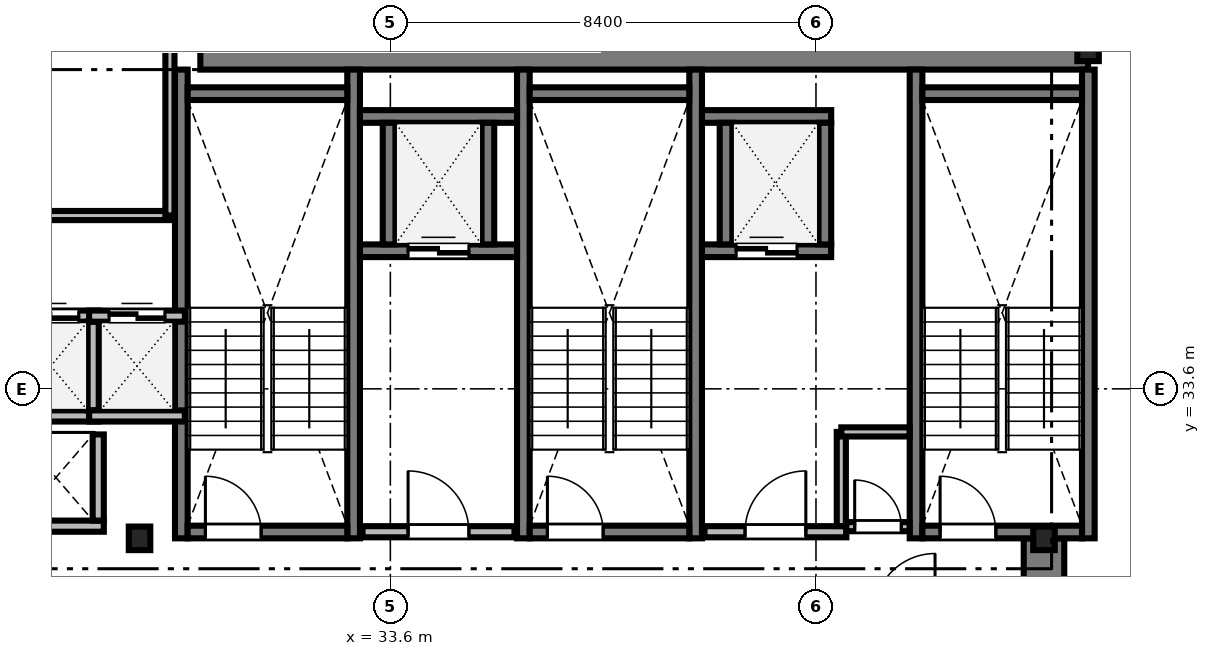
"""IFC4 building model, lengths in metres.
Left out: names, types, materials, properties, quantities, classifications, styles, units other than length and angle.
Written with IfcOpenShell. Run it as: python <this file> out.ifc"""

import sys

from ifc_helpers import new_model, si_unit, direction, frame, frame_2d, origin, origin_2d, place, context, subcontext, project, spatial, rectangle, i_section, extrude, source, transform, mapped, element, fill, save


model = new_model("IFC4")
c1 = context("Model", 3, precision=1e-05, world=origin(), true_north=direction((0.0, 1.0)))
c2 = subcontext(c1, "Body", "Model", "MODEL_VIEW")
j1 = project(units=[si_unit("LENGTHUNIT", "METRE"), si_unit("PLANEANGLEUNIT", "RADIAN")], contexts=[c1])
p1 = place(None, origin())
s1 = spatial("IfcSite", under=j1, at=p1, CompositionType="ELEMENT")
p2 = place(p1, origin())
s2 = spatial("IfcBuilding", under=s1, at=p2, CompositionType="ELEMENT")
p3 = place(p2, frame((0.0, 0.0, 148.3)))
s3 = spatial("IfcBuildingStorey", under=s2, at=p3, CompositionType="ELEMENT", Elevation=148.3)
m1 = source(origin(), c2, "Body", "SweptSolid", [
    extrude(rectangle(XDim=17.52, YDim=0.8, at=frame_2d((8.76, 0.0))), origin(), (0.0, 0.0, 1.0), 3.46),
])
p4 = place(p3, frame((29.85, 40.3, 0.0), z_axis=(0.0, 0.0, 1.0), x_axis=(1.0, 0.0, 0.0)))
e1 = element("IfcWall", 1, at=p4, inside=s3, PredefinedType="SHEAR", context=c2, shape_type="MappedRepresentation", body=[
    mapped(m1, transform((0.0, 0.0, 0.0), scale=1.0)),
])
m2 = source(origin(), c2, "Body", "SweptSolid", [
    extrude(rectangle(XDim=13.15, YDim=0.8, at=frame_2d((6.575, 0.0))), origin(), (0.0, 0.0, 1.0), 3.46),
])
p5 = place(p3, frame((46.5, 17.5, 0.0), z_axis=(0.0, 0.0, 1.0), x_axis=(0.0, 1.0, 0.0)))
e2 = element("IfcWall", 2, at=p5, inside=s3, PredefinedType="SHEAR", context=c2, shape_type="MappedRepresentation", body=[
    mapped(m2, transform((0.0, 0.0, 0.0), scale=1.0)),
])
m3 = source(origin(), c2, "Body", "SweptSolid", [
    extrude(i_section(OverallWidth=0.424, OverallDepth=0.465, WebThickness=0.035, FlangeThickness=0.056, FilletRadius=0.015, at=origin_2d()), origin(), (0.0, 0.0, 1.0), 3.46),
])
for number, where, z_axis, x_axis in (
    (3, (28.65, 30.65, 0.0), (0.0, 0.0, 1.0), (1.0, 0.0, 0.0)),
    (4, (46.5, 30.65, 0.0), (0.0, 0.0, 1.0), (1.0, 0.0, 0.0)),
    (5, (47.37, 40.3, 0.0), (0.0, 0.0, 1.0), (1.0, 0.0, 0.0)),
):
    element("IfcColumn", number, at=place(p3, frame(where, z_axis=z_axis, x_axis=x_axis)), inside=s3, PredefinedType="COLUMN", context=c2, shape_type="MappedRepresentation", body=[
        mapped(m3, transform((0.0, 0.0, 0.0), scale=1.0)),
    ])
m4 = source(origin(), c2, "Body", "SweptSolid", [
    extrude(rectangle(XDim=9.25, YDim=0.25, at=frame_2d((4.625, 0.0))), origin(), (0.0, 0.0, 1.0), 3.5),
])
for number, where, z_axis, x_axis in (
    (6, (29.475, 30.65, 0.0), (0.0, 0.0, 1.0), (0.0, 1.0, 0.0)),
    (7, (32.875, 30.65, 0.0), (0.0, 0.0, 1.0), (0.0, 1.0, 0.0)),
):
    element("IfcWall", number, at=place(p3, frame(where, z_axis=z_axis, x_axis=x_axis)), inside=s3, PredefinedType="SOLIDWALL", context=c2, shape_type="MappedRepresentation", body=[
        mapped(m4, transform((0.0, 0.0, 0.0), scale=1.0)),
    ])
m5 = source(origin(), c2, "Body", "SweptSolid", [
    extrude(rectangle(XDim=3.15, YDim=0.25, at=frame_2d((1.575, 0.0))), origin(), (0.0, 0.0, 1.0), 3.5),
])
p6 = place(p3, frame((29.6, 39.425, 0.0), z_axis=(0.0, 0.0, 1.0), x_axis=(1.0, 0.0, 0.0)))
e8 = element("IfcWall", 8, at=p6, inside=s3, PredefinedType="SOLIDWALL", context=c2, shape_type="MappedRepresentation", body=[
    mapped(m5, transform((0.0, 0.0, 0.0), scale=1.0)),
])
p7 = place(p3, frame((29.6, 30.775, 0.0), z_axis=(0.0, 0.0, 1.0), x_axis=(1.0, 0.0, 0.0)))
e9 = element("IfcWall", 9, at=p7, inside=s3, PredefinedType="SOLIDWALL", context=c2, shape_type="MappedRepresentation", body=[
    mapped(m5, transform((0.0, 0.0, 0.0), scale=1.0)),
])
m6 = source(origin(), c2, "Body", "SweptSolid", [
    extrude(rectangle(XDim=1.1, YDim=2.2, at=frame_2d((0.55, 1.1))), frame((0.0, 0.135, 0.0), z_axis=(0.0, -1.0, 0.0), x_axis=(1.0, 0.0, 0.0)), (0.0, 0.0, 1.0), 0.27),
])
p8 = place(p7, frame((0.35, 0.0, 0.0)))
e10 = element("IfcOpeningElement", 10, at=p8, cuts=e9, PredefinedType="OPENING", context=c2, shape_type="MappedRepresentation", body=[
    mapped(m6, transform((0.0, 0.0, 0.0), scale=1.0)),
])
for number, where, z_axis, x_axis in (
    (11, (36.225, 30.65, 0.0), (0.0, 0.0, 1.0), (0.0, 1.0, 0.0)),
    (12, (39.625, 30.65, 0.0), (0.0, 0.0, 1.0), (0.0, 1.0, 0.0)),
):
    element("IfcWall", number, at=place(p3, frame(where, z_axis=z_axis, x_axis=x_axis)), inside=s3, PredefinedType="SOLIDWALL", context=c2, shape_type="MappedRepresentation", body=[
        mapped(m4, transform((0.0, 0.0, 0.0), scale=1.0)),
    ])
p9 = place(p3, frame((36.35, 39.425, 0.0), z_axis=(0.0, 0.0, 1.0), x_axis=(1.0, 0.0, 0.0)))
e13 = element("IfcWall", 13, at=p9, inside=s3, PredefinedType="SOLIDWALL", context=c2, shape_type="MappedRepresentation", body=[
    mapped(m5, transform((0.0, 0.0, 0.0), scale=1.0)),
])
p10 = place(p3, frame((36.35, 30.775, 0.0), z_axis=(0.0, 0.0, 1.0), x_axis=(1.0, 0.0, 0.0)))
e14 = element("IfcWall", 14, at=p10, inside=s3, PredefinedType="SOLIDWALL", context=c2, shape_type="MappedRepresentation", body=[
    mapped(m5, transform((0.0, 0.0, 0.0), scale=1.0)),
])
p11 = place(p10, frame((0.35, 0.0, 0.0)))
e15 = element("IfcOpeningElement", 15, at=p11, cuts=e14, PredefinedType="OPENING", context=c2, shape_type="MappedRepresentation", body=[
    mapped(m6, transform((0.0, 0.0, 0.0), scale=1.0)),
])
for number, where, z_axis, x_axis in (
    (16, (43.975, 30.65, 0.0), (0.0, 0.0, 1.0), (0.0, 1.0, 0.0)),
    (17, (47.375, 30.65, 0.0), (0.0, 0.0, 1.0), (0.0, 1.0, 0.0)),
):
    element("IfcWall", number, at=place(p3, frame(where, z_axis=z_axis, x_axis=x_axis)), inside=s3, PredefinedType="SOLIDWALL", context=c2, shape_type="MappedRepresentation", body=[
        mapped(m4, transform((0.0, 0.0, 0.0), scale=1.0)),
    ])
p12 = place(p3, frame((44.1, 39.425, 0.0), z_axis=(0.0, 0.0, 1.0), x_axis=(1.0, 0.0, 0.0)))
e18 = element("IfcWall", 18, at=p12, inside=s3, PredefinedType="SOLIDWALL", context=c2, shape_type="MappedRepresentation", body=[
    mapped(m5, transform((0.0, 0.0, 0.0), scale=1.0)),
])
p13 = place(p3, frame((44.1, 30.775, 0.0), z_axis=(0.0, 0.0, 1.0), x_axis=(1.0, 0.0, 0.0)))
e19 = element("IfcWall", 19, at=p13, inside=s3, PredefinedType="SOLIDWALL", context=c2, shape_type="MappedRepresentation", body=[
    mapped(m5, transform((0.0, 0.0, 0.0), scale=1.0)),
])
p14 = place(p13, frame((0.35, 0.0, 0.0)))
e20 = element("IfcOpeningElement", 20, at=p14, cuts=e19, PredefinedType="OPENING", context=c2, shape_type="MappedRepresentation", body=[
    mapped(m6, transform((0.0, 0.0, 0.0), scale=1.0)),
])
m7 = source(origin(), c2, "Body", "SweptSolid", [
    extrude(rectangle(XDim=3.0, YDim=0.22, at=frame_2d((1.5, 0.0))), origin(), (0.0, 0.0, 1.0), 3.46),
])
p15 = place(p3, frame((33.05, 30.78, 0.0), z_axis=(0.0, 0.0, 1.0), x_axis=(1.0, 0.0, 0.0)))
e21 = element("IfcWall", 21, at=p15, inside=s3, PredefinedType="SOLIDWALL", context=c2, shape_type="MappedRepresentation", body=[
    mapped(m7, transform((0.0, 0.0, 0.0), scale=1.0)),
])
m8 = source(origin(), c2, "Body", "SweptSolid", [
    extrude(rectangle(XDim=1.2, YDim=2.2, at=frame_2d((0.6, 1.1))), frame((0.0, 0.12, 0.0), z_axis=(0.0, -1.0, 0.0), x_axis=(1.0, 0.0, 0.0)), (0.0, 0.0, 1.0), 0.24),
])
p16 = place(p15, frame((0.9, 0.0, 0.0)))
e22 = element("IfcOpeningElement", 22, at=p16, cuts=e21, PredefinedType="OPENING", context=c2, shape_type="MappedRepresentation", body=[
    mapped(m8, transform((0.0, 0.0, 0.0), scale=1.0)),
])
m9 = source(origin(), c2, "Body", "SweptSolid", [
    extrude(rectangle(XDim=2.8, YDim=0.22, at=frame_2d((1.4, 0.0))), origin(), (0.0, 0.0, 1.0), 3.46),
])
p17 = place(p3, frame((39.8, 30.78, 0.0), z_axis=(0.0, 0.0, 1.0), x_axis=(1.0, 0.0, 0.0)))
e23 = element("IfcWall", 23, at=p17, inside=s3, PredefinedType="SOLIDWALL", context=c2, shape_type="MappedRepresentation", body=[
    mapped(m9, transform((0.0, 0.0, 0.0), scale=1.0)),
])
p18 = place(p17, frame((0.8, 0.0, 0.0)))
e24 = element("IfcOpeningElement", 24, at=p18, cuts=e23, PredefinedType="OPENING", context=c2, shape_type="MappedRepresentation", body=[
    mapped(m8, transform((0.0, 0.0, 0.0), scale=1.0)),
])
m10 = source(origin(), c2, "Body", "SweptSolid", [
    extrude(rectangle(XDim=1.89, YDim=0.22, at=frame_2d((0.945, 0.0))), origin(), (0.0, 0.0, 1.0), 3.46),
])
p19 = place(p3, frame((25.955, 33.065, 0.0), z_axis=(0.0, 0.0, 1.0), x_axis=(1.0, 0.0, 0.0)))
e25 = element("IfcWall", 25, at=p19, inside=s3, PredefinedType="SOLIDWALL", context=c2, shape_type="MappedRepresentation", body=[
    mapped(m10, transform((0.0, 0.0, 0.0), scale=1.0)),
])
p20 = place(p3, frame((25.955, 35.035, 0.0), z_axis=(0.0, 0.0, 1.0), x_axis=(1.0, 0.0, 0.0)))
e26 = element("IfcWall", 26, at=p20, inside=s3, PredefinedType="SOLIDWALL", context=c2, shape_type="MappedRepresentation", body=[
    mapped(m10, transform((0.0, 0.0, 0.0), scale=1.0)),
])
m11 = source(origin(), c2, "Body", "SweptSolid", [
    extrude(rectangle(XDim=1.1, YDim=2.2, at=frame_2d((0.55, 1.1))), frame((0.0, 0.12, 0.0), z_axis=(0.0, -1.0, 0.0), x_axis=(1.0, 0.0, 0.0)), (0.0, 0.0, 1.0), 0.24),
])
p21 = place(p20, frame((0.395, 0.0, 0.0)))
e27 = element("IfcOpeningElement", 27, at=p21, cuts=e26, PredefinedType="OPENING", context=c2, shape_type="MappedRepresentation", body=[
    mapped(m11, transform((0.0, 0.0, 0.0), scale=1.0)),
])
m12 = source(origin(), c2, "Body", "SweptSolid", [
    extrude(rectangle(XDim=1.75, YDim=0.22, at=frame_2d((0.875, 0.0))), origin(), (0.0, 0.0, 1.0), 3.46),
])
p22 = place(p3, frame((27.735, 33.175, 0.0), z_axis=(0.0, 0.0, 1.0), x_axis=(0.0, 1.0, 0.0)))
e28 = element("IfcWall", 28, at=p22, inside=s3, PredefinedType="SOLIDWALL", context=c2, shape_type="MappedRepresentation", body=[
    mapped(m12, transform((0.0, 0.0, 0.0), scale=1.0)),
])
p23 = place(p3, frame((27.655, 33.065, 0.0), z_axis=(0.0, 0.0, 1.0), x_axis=(1.0, 0.0, 0.0)))
e29 = element("IfcWall", 29, at=p23, inside=s3, PredefinedType="SOLIDWALL", context=c2, shape_type="MappedRepresentation", body=[
    mapped(m10, transform((0.0, 0.0, 0.0), scale=1.0)),
])
p24 = place(p3, frame((27.655, 35.035, 0.0), z_axis=(0.0, 0.0, 1.0), x_axis=(1.0, 0.0, 0.0)))
e30 = element("IfcWall", 30, at=p24, inside=s3, PredefinedType="SOLIDWALL", context=c2, shape_type="MappedRepresentation", body=[
    mapped(m10, transform((0.0, 0.0, 0.0), scale=1.0)),
])
p25 = place(p24, frame((0.395, 0.0, 0.0)))
e31 = element("IfcOpeningElement", 31, at=p25, cuts=e30, PredefinedType="OPENING", context=c2, shape_type="MappedRepresentation", body=[
    mapped(m11, transform((0.0, 0.0, 0.0), scale=1.0)),
])
m13 = source(origin(), c2, "Body", "SweptSolid", [
    extrude(rectangle(XDim=3.1, YDim=0.25, at=frame_2d((1.55, 0.0))), origin(), (0.0, 0.0, 1.0), 3.46),
])
p26 = place(p3, frame((33.0, 36.325, 0.0), z_axis=(0.0, 0.0, 1.0), x_axis=(1.0, 0.0, 0.0)))
e32 = element("IfcWall", 32, at=p26, inside=s3, PredefinedType="SOLIDWALL", context=c2, shape_type="MappedRepresentation", body=[
    mapped(m13, transform((0.0, 0.0, 0.0), scale=1.0)),
])
m14 = source(origin(), c2, "Body", "SweptSolid", [
    extrude(rectangle(XDim=1.2, YDim=2.25, at=frame_2d((0.6, 1.125))), frame((0.0, 0.135, 0.0), z_axis=(0.0, -1.0, 0.0), x_axis=(1.0, 0.0, 0.0)), (0.0, 0.0, 1.0), 0.27),
])
p27 = place(p26, frame((0.95, 0.0, 0.0)))
e33 = element("IfcOpeningElement", 33, at=p27, cuts=e32, PredefinedType="OPENING", context=c2, shape_type="MappedRepresentation", body=[
    mapped(m14, transform((0.0, 0.0, 0.0), scale=1.0)),
])
p28 = place(p3, frame((33.0, 38.975, 0.0), z_axis=(0.0, 0.0, 1.0), x_axis=(1.0, 0.0, 0.0)))
e34 = element("IfcWall", 34, at=p28, inside=s3, PredefinedType="SOLIDWALL", context=c2, shape_type="MappedRepresentation", body=[
    mapped(m13, transform((0.0, 0.0, 0.0), scale=1.0)),
])
m15 = source(origin(), c2, "Body", "SweptSolid", [
    extrude(rectangle(XDim=2.4, YDim=0.25, at=frame_2d((1.2, 0.0))), origin(), (0.0, 0.0, 1.0), 3.46),
])
for number, where, z_axis, x_axis in (
    (35, (33.575, 36.45, 0.0), (0.0, 0.0, 1.0), (0.0, 1.0, 0.0)),
    (36, (35.525, 36.45, 0.0), (0.0, 0.0, 1.0), (0.0, 1.0, 0.0)),
):
    element("IfcWall", number, at=place(p3, frame(where, z_axis=z_axis, x_axis=x_axis)), inside=s3, PredefinedType="SOLIDWALL", context=c2, shape_type="MappedRepresentation", body=[
        mapped(m15, transform((0.0, 0.0, 0.0), scale=1.0)),
    ])
m16 = source(origin(), c2, "Body", "SweptSolid", [
    extrude(rectangle(XDim=2.55, YDim=0.25, at=frame_2d((1.275, 0.0))), origin(), (0.0, 0.0, 1.0), 3.46),
])
p29 = place(p3, frame((39.75, 36.325, 0.0), z_axis=(0.0, 0.0, 1.0), x_axis=(1.0, 0.0, 0.0)))
e37 = element("IfcWall", 37, at=p29, inside=s3, PredefinedType="SOLIDWALL", context=c2, shape_type="MappedRepresentation", body=[
    mapped(m16, transform((0.0, 0.0, 0.0), scale=1.0)),
])
p30 = place(p29, frame((0.675, 0.0, 0.0)))
e38 = element("IfcOpeningElement", 38, at=p30, cuts=e37, PredefinedType="OPENING", context=c2, shape_type="MappedRepresentation", body=[
    mapped(m14, transform((0.0, 0.0, 0.0), scale=1.0)),
])
p31 = place(p3, frame((39.75, 38.975, 0.0), z_axis=(0.0, 0.0, 1.0), x_axis=(1.0, 0.0, 0.0)))
e39 = element("IfcWall", 39, at=p31, inside=s3, PredefinedType="SOLIDWALL", context=c2, shape_type="MappedRepresentation", body=[
    mapped(m16, transform((0.0, 0.0, 0.0), scale=1.0)),
])
for number, where, z_axis, x_axis in (
    (40, (40.225, 36.45, 0.0), (0.0, 0.0, 1.0), (0.0, 1.0, 0.0)),
    (41, (42.175, 36.45, 0.0), (0.0, 0.0, 1.0), (0.0, 1.0, 0.0)),
):
    element("IfcWall", number, at=place(p3, frame(where, z_axis=z_axis, x_axis=x_axis)), inside=s3, PredefinedType="SOLIDWALL", context=c2, shape_type="MappedRepresentation", body=[
        mapped(m15, transform((0.0, 0.0, 0.0), scale=1.0)),
    ])
m17 = source(origin(), c2, "Body", "SweptSolid", [
    extrude(rectangle(XDim=1.89, YDim=0.22, at=frame_2d((0.945, 0.0))), origin(), (0.0, 0.0, 1.0), 3.46),
])
p32 = place(p3, frame((26.055, 30.89, 0.0), z_axis=(0.0, 0.0, 1.0), x_axis=(1.0, 0.0, 0.0)))
e42 = element("IfcWall", 42, at=p32, inside=s3, PredefinedType="SOLIDWALL", context=c2, shape_type="MappedRepresentation", body=[
    mapped(m17, transform((0.0, 0.0, 0.0), scale=1.0)),
])
m18 = source(origin(), c2, "Body", "SweptSolid", [
    extrude(rectangle(XDim=1.7, YDim=0.22, at=frame_2d((0.85, 0.0))), origin(), (0.0, 0.0, 1.0), 3.46),
])
p33 = place(p3, frame((27.835, 31.0, 0.0), z_axis=(0.0, 0.0, 1.0), x_axis=(0.0, 1.0, 0.0)))
e43 = element("IfcWall", 43, at=p33, inside=s3, PredefinedType="SOLIDWALL", context=c2, shape_type="MappedRepresentation", body=[
    mapped(m18, transform((0.0, 0.0, 0.0), scale=1.0)),
])
m19 = source(origin(), c2, "Body", "SweptSolid", [
    extrude(rectangle(XDim=22.328, YDim=0.18, at=frame_2d((11.164, 0.0))), origin(), (0.0, 0.0, 1.0), 2.702),
])
p34 = place(p3, frame((6.922, 37.02, 0.0), z_axis=(0.0, 0.0, 1.0), x_axis=(1.0, 0.0, 0.0)))
e44 = element("IfcWall", 44, at=p34, inside=s3, PredefinedType="PARTITIONING", context=c2, shape_type="MappedRepresentation", body=[
    mapped(m19, transform((0.0, 0.0, 0.0), scale=1.0)),
])
m20 = source(origin(), c2, "Body", "SweptSolid", [
    extrude(rectangle(XDim=1.05, YDim=2.2, at=frame_2d((0.525, 1.1))), frame((0.0, 0.1, 0.0), z_axis=(0.0, -1.0, 0.0), x_axis=(1.0, 0.0, 0.0)), (0.0, 0.0, 1.0), 0.2),
])
p35 = place(p34, frame((14.928, 0.0, 0.0)))
e45 = element("IfcOpeningElement", 45, at=p35, cuts=e44, PredefinedType="OPENING", context=c2, shape_type="MappedRepresentation", body=[
    mapped(m20, transform((0.0, 0.0, 0.0), scale=1.0)),
])
m21 = source(origin(), c2, "Body", "SweptSolid", [
    extrude(rectangle(XDim=1.248, YDim=0.18, at=frame_2d((0.624, 0.0))), origin(), (0.0, 0.0, 1.0), 3.46),
])
p36 = place(p3, frame((42.6, 30.88, 0.0), z_axis=(0.0, 0.0, 1.0), x_axis=(1.0, 0.0, 0.0)))
e46 = element("IfcWall", 46, at=p36, inside=s3, PredefinedType="PARTITIONING", context=c2, shape_type="MappedRepresentation", body=[
    mapped(m21, transform((0.0, 0.0, 0.0), scale=1.0)),
])
m22 = source(origin(), c2, "Body", "SweptSolid", [
    extrude(rectangle(XDim=0.92, YDim=2.1, at=frame_2d((0.46, 1.05))), frame((0.0, 0.1, 0.0), z_axis=(0.0, -1.0, 0.0), x_axis=(1.0, 0.0, 0.0)), (0.0, 0.0, 1.0), 0.2),
])
p37 = place(p36, frame((0.164, 0.0, 0.0)))
e47 = element("IfcOpeningElement", 47, at=p37, cuts=e46, PredefinedType="OPENING", context=c2, shape_type="MappedRepresentation", body=[
    mapped(m22, transform((0.0, 0.0, 0.0), scale=1.0)),
])
m23 = source(origin(), c2, "Body", "SweptSolid", [
    extrude(rectangle(XDim=11.45, YDim=0.18, at=frame_2d((5.725, 0.0))), origin(), (0.0, 0.0, 1.0), 2.702),
])
p38 = place(p3, frame((29.25, 37.02, 0.0), z_axis=(0.0, 0.0, 1.0), x_axis=(0.0, 1.0, 0.0)))
e48 = element("IfcWall", 48, at=p38, inside=s3, PredefinedType="PARTITIONING", context=c2, shape_type="MappedRepresentation", body=[
    mapped(m23, transform((0.0, 0.0, 0.0), scale=1.0)),
])
m24 = source(origin(), c2, "Body", "SweptSolid", [
    extrude(rectangle(XDim=1.858, YDim=0.18, at=frame_2d((0.929, 0.0))), origin(), (0.0, 0.0, 1.0), 3.46),
])
p39 = place(p3, frame((42.5, 30.892, 0.0), z_axis=(0.0, 0.0, 1.0), x_axis=(0.0, 1.0, 0.0)))
e49 = element("IfcWall", 49, at=p39, inside=s3, PredefinedType="PARTITIONING", context=c2, shape_type="MappedRepresentation", body=[
    mapped(m24, transform((0.0, 0.0, 0.0), scale=1.0)),
])
m25 = source(origin(), c2, "Body", "SweptSolid", [
    extrude(rectangle(XDim=1.348, YDim=0.18, at=frame_2d((0.674, 0.0))), origin(), (0.0, 0.0, 1.0), 3.46),
])
p40 = place(p3, frame((42.5, 32.75, 0.0), z_axis=(0.0, 0.0, 1.0), x_axis=(1.0, 0.0, 0.0)))
e50 = element("IfcWall", 50, at=p40, inside=s3, PredefinedType="PARTITIONING", context=c2, shape_type="MappedRepresentation", body=[
    mapped(m25, transform((0.0, 0.0, 0.0), scale=1.0)),
])
m26 = source(origin(), c2, "Body", "SweptSolid", [
    extrude(rectangle(XDim=1.1, YDim=2.2, at=frame_2d((0.55, 1.1))), frame((0.0, 0.025, 0.0), z_axis=(0.0, -1.0, 0.0), x_axis=(1.0, 0.0, 0.0)), (0.0, 0.0, 1.0), 0.05),
])
p41 = place(p8, origin())
e51 = element("IfcDoor", 51, at=p41, inside=s3, OperationType="SINGLE_SWING_LEFT", PredefinedType="DOOR", context=c2, shape_type="MappedRepresentation", body=[
    mapped(m26, transform((0.0, 0.0, 0.0), scale=1.0)),
])
fill(e10, e51)
p42 = place(p11, origin())
e52 = element("IfcDoor", 52, at=p42, inside=s3, OperationType="SINGLE_SWING_LEFT", PredefinedType="DOOR", context=c2, shape_type="MappedRepresentation", body=[
    mapped(m26, transform((0.0, 0.0, 0.0), scale=1.0)),
])
fill(e15, e52)
p43 = place(p14, origin())
e53 = element("IfcDoor", 53, at=p43, inside=s3, OperationType="SINGLE_SWING_LEFT", PredefinedType="DOOR", context=c2, shape_type="MappedRepresentation", body=[
    mapped(m26, transform((0.0, 0.0, 0.0), scale=1.0)),
])
fill(e20, e53)
m27 = source(origin(), c2, "Body", "SweptSolid", [
    extrude(rectangle(XDim=1.2, YDim=2.2, at=frame_2d((0.6, 1.1))), frame((0.0, 0.025, 0.0), z_axis=(0.0, -1.0, 0.0), x_axis=(1.0, 0.0, 0.0)), (0.0, 0.0, 1.0), 0.05),
])
p44 = place(p16, origin())
e54 = element("IfcDoor", 54, at=p44, inside=s3, OperationType="SINGLE_SWING_LEFT", PredefinedType="DOOR", context=c2, shape_type="MappedRepresentation", body=[
    mapped(m27, transform((0.0, 0.0, 0.0), scale=1.0)),
])
fill(e22, e54)
p45 = place(p18, origin())
e55 = element("IfcDoor", 55, at=p45, inside=s3, OperationType="SINGLE_SWING_RIGHT", PredefinedType="DOOR", context=c2, shape_type="MappedRepresentation", body=[
    mapped(m27, transform((0.0, 0.0, 0.0), scale=1.0)),
])
fill(e24, e55)
p46 = place(p21, origin())
e56 = element("IfcDoor", 56, at=p46, inside=s3, OperationType="DOUBLE_DOOR_SLIDING", PredefinedType="DOOR", context=c2, shape_type="MappedRepresentation", body=[
    mapped(m26, transform((0.0, 0.0, 0.0), scale=1.0)),
])
fill(e27, e56)
p47 = place(p25, origin())
e57 = element("IfcDoor", 57, at=p47, inside=s3, OperationType="DOUBLE_DOOR_SLIDING", PredefinedType="DOOR", context=c2, shape_type="MappedRepresentation", body=[
    mapped(m26, transform((0.0, 0.0, 0.0), scale=1.0)),
])
fill(e31, e57)
m28 = source(origin(), c2, "Body", "SweptSolid", [
    extrude(rectangle(XDim=1.2, YDim=2.25, at=frame_2d((0.6, 1.125))), frame((0.0, 0.025, 0.0), z_axis=(0.0, -1.0, 0.0), x_axis=(1.0, 0.0, 0.0)), (0.0, 0.0, 1.0), 0.05),
])
p48 = place(p27, origin())
e58 = element("IfcDoor", 58, at=p48, inside=s3, OperationType="DOUBLE_DOOR_SLIDING", PredefinedType="DOOR", context=c2, shape_type="MappedRepresentation", body=[
    mapped(m28, transform((0.0, 0.0, 0.0), scale=1.0)),
])
fill(e33, e58)
p49 = place(p30, origin())
e59 = element("IfcDoor", 59, at=p49, inside=s3, OperationType="DOUBLE_DOOR_SLIDING", PredefinedType="DOOR", context=c2, shape_type="MappedRepresentation", body=[
    mapped(m28, transform((0.0, 0.0, 0.0), scale=1.0)),
])
fill(e38, e59)
m29 = source(origin(), c2, "Body", "SweptSolid", [
    extrude(rectangle(XDim=0.92, YDim=2.1, at=frame_2d((0.46, 1.05))), frame((0.0, 0.025, 0.0), z_axis=(0.0, -1.0, 0.0), x_axis=(1.0, 0.0, 0.0)), (0.0, 0.0, 1.0), 0.05),
])
p50 = place(p37, origin())
e60 = element("IfcDoor", 60, at=p50, inside=s3, OperationType="SINGLE_SWING_LEFT", PredefinedType="DOOR", context=c2, shape_type="MappedRepresentation", body=[
    mapped(m29, transform((0.0, 0.0, 0.0), scale=1.0)),
])
fill(e47, e60)
save(model, sys.argv[1])
